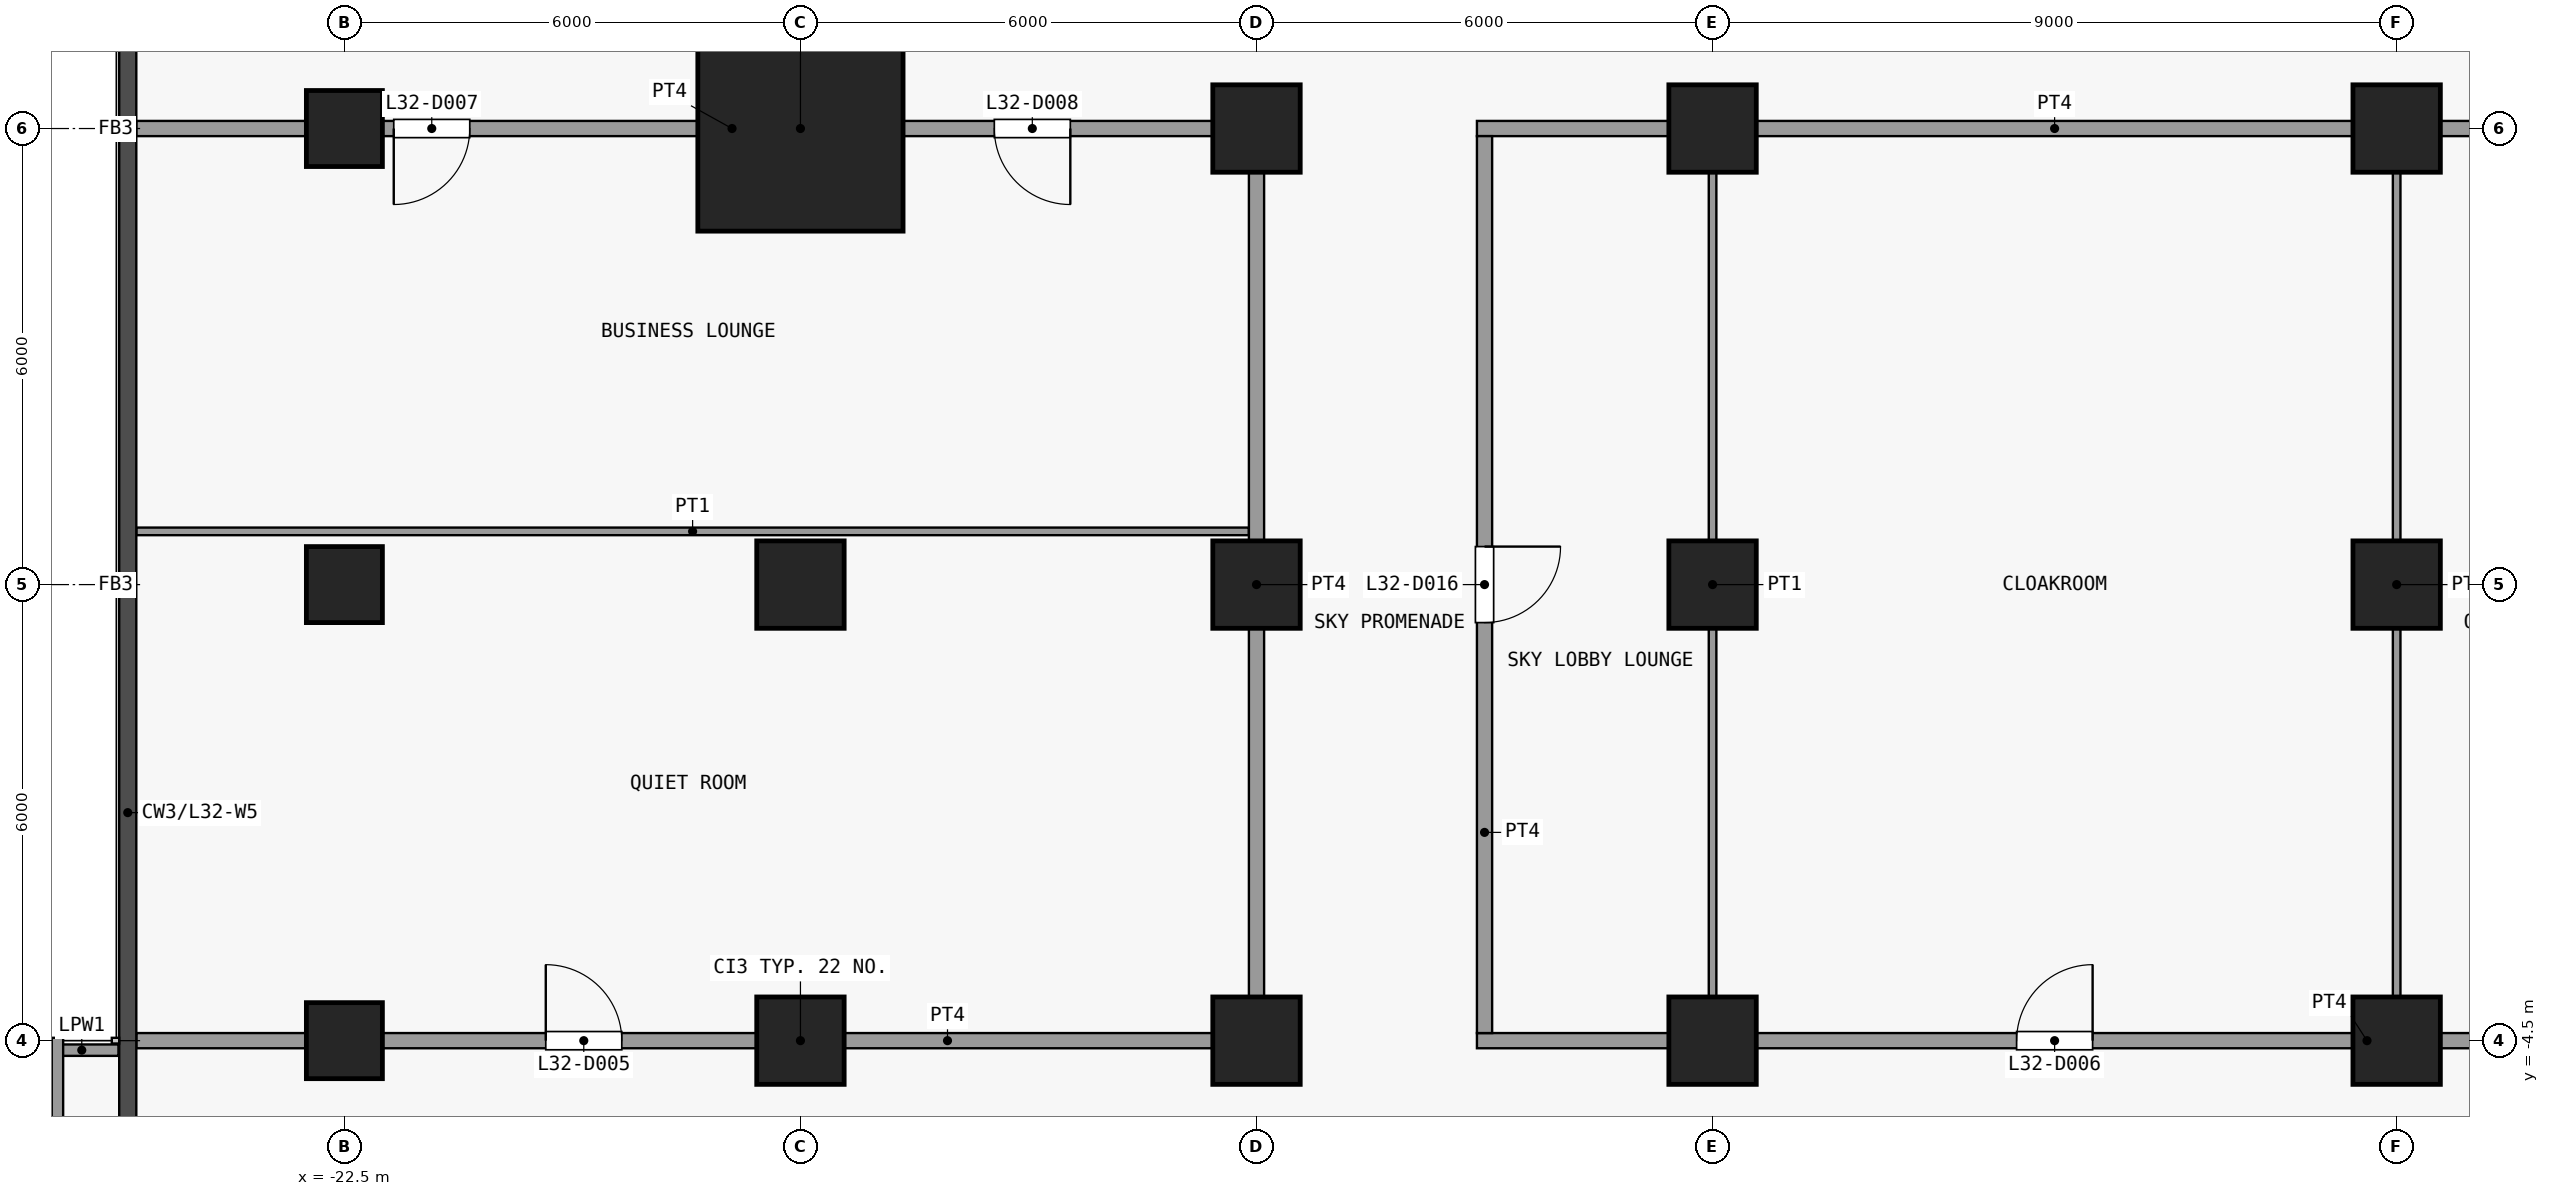
"""IFC4 building model, lengths in metres.
Left out: names, types, materials, properties, quantities, classifications, styles, units other than length and angle.
Written with IfcOpenShell. Run it as: python <this file> out.ifc"""

import sys

from ifc_helpers import new_model, si_unit, direction, frame, frame_2d, origin, origin_2d, place, context, subcontext, project, spatial, rectangle, extrude, element, fill, save


model = new_model("IFC4")
c1 = context("Model", 3, precision=1e-05, world=origin(), true_north=direction((0.0, 1.0)))
c2 = subcontext(c1, "Body", "Model", "MODEL_VIEW")
j1 = project(units=[si_unit("LENGTHUNIT", "METRE"), si_unit("PLANEANGLEUNIT", "RADIAN")], contexts=[c1])
p1 = place(None, origin())
s1 = spatial("IfcSite", under=j1, at=p1, CompositionType="ELEMENT")
p2 = place(p1, origin())
s2 = spatial("IfcBuilding", under=s1, at=p2, CompositionType="ELEMENT")
p3 = place(p2, frame((0.0, 0.0, 127.9)))
s3 = spatial("IfcBuildingStorey", under=s2, at=p3, CompositionType="ELEMENT", Elevation=127.9)
for number, where, z_axis, x_axis in (
    (1, (-22.5, -4.5, 0.0), (0.0, 0.0, 1.0), (1.0, 0.0, 0.0)),
    (2, (-22.5, 1.5, 0.0), (0.0, 0.0, 1.0), (1.0, 0.0, 0.0)),
    (3, (-22.5, 7.5, 0.0), (0.0, 0.0, 1.0), (1.0, 0.0, 0.0)),
):
    element("IfcColumn", number, at=place(p3, frame(where, z_axis=z_axis, x_axis=x_axis)), inside=s3, PredefinedType="COLUMN", context=c2, shape_type="SweptSolid", body=[
        extrude(rectangle(XDim=1.0, YDim=1.0, at=origin_2d()), origin(), (0.0, 0.0, 1.0), 6.0),
    ])
for number, where, z_axis, x_axis in (
    (4, (-16.5, -4.5, 0.0), (0.0, 0.0, 1.0), (1.0, 0.0, 0.0)),
    (5, (-16.5, 1.5, 0.0), (0.0, 0.0, 1.0), (1.0, 0.0, 0.0)),
):
    element("IfcColumn", number, at=place(p3, frame(where, z_axis=z_axis, x_axis=x_axis)), inside=s3, PredefinedType="COLUMN", context=c2, shape_type="SweptSolid", body=[
        extrude(rectangle(XDim=1.15, YDim=1.15, at=origin_2d()), origin(), (0.0, 0.0, 1.0), 6.0),
    ])
p4 = place(p3, frame((-16.5, 7.5, 0.0), z_axis=(0.0, 0.0, 1.0), x_axis=(1.0, 0.0, 0.0)))
e6 = element("IfcColumn", 6, at=p4, inside=s3, PredefinedType="COLUMN", context=c2, shape_type="SweptSolid", body=[
    extrude(rectangle(XDim=2.7, YDim=2.7, at=origin_2d()), origin(), (0.0, 0.0, 1.0), 6.0),
])
for number, where, z_axis, x_axis in (
    (7, (-10.5, -4.5, 0.0), (0.0, 0.0, 1.0), (1.0, 0.0, 0.0)),
    (8, (-10.5, 1.5, 0.0), (0.0, 0.0, 1.0), (1.0, 0.0, 0.0)),
    (9, (-10.5, 7.5, 0.0), (0.0, 0.0, 1.0), (1.0, 0.0, 0.0)),
    (10, (-4.5, -4.5, 0.0), (0.0, 0.0, 1.0), (1.0, 0.0, 0.0)),
    (11, (-4.5, 1.5, 0.0), (0.0, 0.0, 1.0), (1.0, 0.0, 0.0)),
    (12, (-4.5, 7.5, 0.0), (0.0, 0.0, 1.0), (1.0, 0.0, 0.0)),
    (13, (4.5, -4.5, 0.0), (0.0, 0.0, 1.0), (1.0, 0.0, 0.0)),
    (14, (4.5, 1.5, 0.0), (0.0, 0.0, 1.0), (1.0, 0.0, 0.0)),
    (15, (4.5, 7.5, 0.0), (0.0, 0.0, 1.0), (1.0, 0.0, 0.0)),
):
    element("IfcColumn", number, at=place(p3, frame(where, z_axis=z_axis, x_axis=x_axis)), inside=s3, PredefinedType="COLUMN", context=c2, shape_type="SweptSolid", body=[
        extrude(rectangle(XDim=1.15, YDim=1.15, at=origin_2d()), origin(), (0.0, 0.0, 1.0), 6.0),
    ])
p5 = place(p3, frame((-26.438, -4.625, 0.0), z_axis=(0.0, 0.0, 1.0), x_axis=(1.0, 0.0, 0.0)))
e16 = element("IfcWall", 16, at=p5, inside=s3, PredefinedType="PARAPET", context=c2, shape_type="SweptSolid", body=[
    extrude(rectangle(XDim=0.965, YDim=0.15, at=frame_2d((0.482, 0.0))), origin(), (0.0, 0.0, 1.0), 1.15),
])
p6 = place(p3, frame((-26.275, -13.3, 0.0), z_axis=(0.0, 0.0, 1.0), x_axis=(0.0, 1.0, 0.0)))
e17 = element("IfcWall", 17, at=p6, inside=s3, PredefinedType="PARAPET", context=c2, shape_type="SweptSolid", body=[
    extrude(rectangle(XDim=8.838, YDim=0.15, at=frame_2d((4.419, 0.0))), origin(), (0.0, 0.0, 1.0), 1.15),
])
p7 = place(p3, frame((-25.238, -4.5, 0.0), z_axis=(0.0, 0.0, 1.0), x_axis=(1.0, 0.0, 0.0)))
e18 = element("IfcWall", 18, at=p7, inside=s3, PredefinedType="PARTITIONING", context=c2, shape_type="SweptSolid", body=[
    extrude(rectangle(XDim=14.838, YDim=0.2, at=frame_2d((7.419, 0.0))), origin(), (0.0, 0.0, 1.0), 5.7),
])
p8 = place(p7, frame((5.387, 0.0, 0.0)))
e19 = element("IfcOpeningElement", 19, at=p8, cuts=e18, PredefinedType="OPENING", context=c2, shape_type="SweptSolid", body=[
    extrude(rectangle(XDim=1.0, YDim=2.1, at=frame_2d((0.5, 1.05))), frame((0.0, 0.11, 0.0), z_axis=(0.0, -1.0, 0.0), x_axis=(1.0, 0.0, 0.0)), (0.0, 0.0, 1.0), 0.22),
])
p9 = place(p3, frame((-7.6, -4.5, 0.0), z_axis=(0.0, 0.0, 1.0), x_axis=(1.0, 0.0, 0.0)))
e20 = element("IfcWall", 20, at=p9, inside=s3, PredefinedType="PARTITIONING", context=c2, shape_type="SweptSolid", body=[
    extrude(rectangle(XDim=15.2, YDim=0.2, at=frame_2d((7.6, 0.0))), origin(), (0.0, 0.0, 1.0), 5.7),
])
p10 = place(p9, frame((7.1, 0.0, 0.0)))
e21 = element("IfcOpeningElement", 21, at=p10, cuts=e20, PredefinedType="OPENING", context=c2, shape_type="SweptSolid", body=[
    extrude(rectangle(XDim=1.0, YDim=2.1, at=frame_2d((0.5, 1.05))), frame((0.0, 0.11, 0.0), z_axis=(0.0, -1.0, 0.0), x_axis=(1.0, 0.0, 0.0)), (0.0, 0.0, 1.0), 0.22),
])
p11 = place(p3, frame((-25.238, 2.2, 0.0), z_axis=(0.0, 0.0, 1.0), x_axis=(1.0, 0.0, 0.0)))
e22 = element("IfcWall", 22, at=p11, inside=s3, PredefinedType="PARTITIONING", context=c2, shape_type="SweptSolid", body=[
    extrude(rectangle(XDim=14.637, YDim=0.1, at=frame_2d((7.319, 0.0))), origin(), (0.0, 0.0, 1.0), 5.7),
])
p12 = place(p3, frame((-25.238, 7.5, 0.0), z_axis=(0.0, 0.0, 1.0), x_axis=(1.0, 0.0, 0.0)))
e23 = element("IfcWall", 23, at=p12, inside=s3, PredefinedType="PARTITIONING", context=c2, shape_type="SweptSolid", body=[
    extrude(rectangle(XDim=14.838, YDim=0.2, at=frame_2d((7.419, 0.0))), origin(), (0.0, 0.0, 1.0), 5.7),
])
p13 = place(p12, frame((3.387, 0.0, 0.0)))
e24 = element("IfcOpeningElement", 24, at=p13, cuts=e23, PredefinedType="OPENING", context=c2, shape_type="SweptSolid", body=[
    extrude(rectangle(XDim=1.0, YDim=2.1, at=frame_2d((0.5, 1.05))), frame((0.0, 0.11, 0.0), z_axis=(0.0, -1.0, 0.0), x_axis=(1.0, 0.0, 0.0)), (0.0, 0.0, 1.0), 0.22),
])
p14 = place(p12, frame((11.288, 0.0, 0.0)))
e25 = element("IfcOpeningElement", 25, at=p14, cuts=e23, PredefinedType="OPENING", context=c2, shape_type="SweptSolid", body=[
    extrude(rectangle(XDim=1.0, YDim=2.1, at=frame_2d((0.5, 1.05))), frame((0.0, 0.11, 0.0), z_axis=(0.0, -1.0, 0.0), x_axis=(1.0, 0.0, 0.0)), (0.0, 0.0, 1.0), 0.22),
])
p15 = place(p3, frame((-7.6, 7.5, 0.0), z_axis=(0.0, 0.0, 1.0), x_axis=(1.0, 0.0, 0.0)))
e26 = element("IfcWall", 26, at=p15, inside=s3, PredefinedType="PARTITIONING", context=c2, shape_type="SweptSolid", body=[
    extrude(rectangle(XDim=15.2, YDim=0.2, at=frame_2d((7.6, 0.0))), origin(), (0.0, 0.0, 1.0), 5.7),
])
p16 = place(p3, frame((-10.5, -4.4, 0.0), z_axis=(0.0, 0.0, 1.0), x_axis=(0.0, 1.0, 0.0)))
e27 = element("IfcWall", 27, at=p16, inside=s3, PredefinedType="PARTITIONING", context=c2, shape_type="SweptSolid", body=[
    extrude(rectangle(XDim=11.8, YDim=0.2, at=frame_2d((5.9, 0.0))), origin(), (0.0, 0.0, 1.0), 5.7),
])
p17 = place(p3, frame((-7.5, -4.4, 0.0), z_axis=(0.0, 0.0, 1.0), x_axis=(0.0, 1.0, 0.0)))
e28 = element("IfcWall", 28, at=p17, inside=s3, PredefinedType="PARTITIONING", context=c2, shape_type="SweptSolid", body=[
    extrude(rectangle(XDim=11.8, YDim=0.2, at=frame_2d((5.9, 0.0))), origin(), (0.0, 0.0, 1.0), 5.7),
])
p18 = place(p17, frame((5.4, 0.0, 0.0)))
e29 = element("IfcOpeningElement", 29, at=p18, cuts=e28, PredefinedType="OPENING", context=c2, shape_type="SweptSolid", body=[
    extrude(rectangle(XDim=1.0, YDim=2.1, at=frame_2d((0.5, 1.05))), frame((0.0, 0.11, 0.0), z_axis=(0.0, -1.0, 0.0), x_axis=(1.0, 0.0, 0.0)), (0.0, 0.0, 1.0), 0.22),
])
for number, where, z_axis, x_axis in (
    (30, (-4.5, -4.4, 0.0), (0.0, 0.0, 1.0), (0.0, 1.0, 0.0)),
    (31, (4.5, -4.4, 0.0), (0.0, 0.0, 1.0), (0.0, 1.0, 0.0)),
):
    element("IfcWall", number, at=place(p3, frame(where, z_axis=z_axis, x_axis=x_axis)), inside=s3, PredefinedType="PARTITIONING", context=c2, shape_type="SweptSolid", body=[
        extrude(rectangle(XDim=11.8, YDim=0.1, at=frame_2d((5.9, 0.0))), origin(), (0.0, 0.0, 1.0), 5.7),
    ])
p19 = place(p8, origin())
e32 = element("IfcDoor", 32, at=p19, inside=s3, OperationType="SINGLE_SWING_RIGHT", PredefinedType="DOOR", context=c2, shape_type="SweptSolid", body=[
    extrude(rectangle(XDim=1.0, YDim=2.1, at=frame_2d((0.5, 1.05))), frame((0.0, 0.025, 0.0), z_axis=(0.0, -1.0, 0.0), x_axis=(1.0, 0.0, 0.0)), (0.0, 0.0, 1.0), 0.05),
])
fill(e19, e32)
p20 = place(p10, origin())
e33 = element("IfcDoor", 33, at=p20, inside=s3, OperationType="SINGLE_SWING_LEFT", PredefinedType="DOOR", context=c2, shape_type="SweptSolid", body=[
    extrude(rectangle(XDim=1.0, YDim=2.1, at=frame_2d((0.5, 1.05))), frame((0.0, 0.025, 0.0), z_axis=(0.0, -1.0, 0.0), x_axis=(1.0, 0.0, 0.0)), (0.0, 0.0, 1.0), 0.05),
])
fill(e21, e33)
p21 = place(p13, origin())
e34 = element("IfcDoor", 34, at=p21, inside=s3, OperationType="SINGLE_SWING_LEFT", PredefinedType="DOOR", context=c2, shape_type="SweptSolid", body=[
    extrude(rectangle(XDim=1.0, YDim=2.1, at=frame_2d((0.5, 1.05))), frame((0.0, 0.025, 0.0), z_axis=(0.0, -1.0, 0.0), x_axis=(1.0, 0.0, 0.0)), (0.0, 0.0, 1.0), 0.05),
])
fill(e24, e34)
p22 = place(p14, origin())
e35 = element("IfcDoor", 35, at=p22, inside=s3, OperationType="SINGLE_SWING_RIGHT", PredefinedType="DOOR", context=c2, shape_type="SweptSolid", body=[
    extrude(rectangle(XDim=1.0, YDim=2.1, at=frame_2d((0.5, 1.05))), frame((0.0, 0.025, 0.0), z_axis=(0.0, -1.0, 0.0), x_axis=(1.0, 0.0, 0.0)), (0.0, 0.0, 1.0), 0.05),
])
fill(e25, e35)
p23 = place(p18, origin())
e36 = element("IfcDoor", 36, at=p23, inside=s3, OperationType="SINGLE_SWING_RIGHT", PredefinedType="DOOR", context=c2, shape_type="SweptSolid", body=[
    extrude(rectangle(XDim=1.0, YDim=2.1, at=frame_2d((0.5, 1.05))), frame((0.0, 0.025, 0.0), z_axis=(0.0, -1.0, 0.0), x_axis=(1.0, 0.0, 0.0)), (0.0, 0.0, 1.0), 0.05),
])
fill(e29, e36)
save(model, sys.argv[1])
